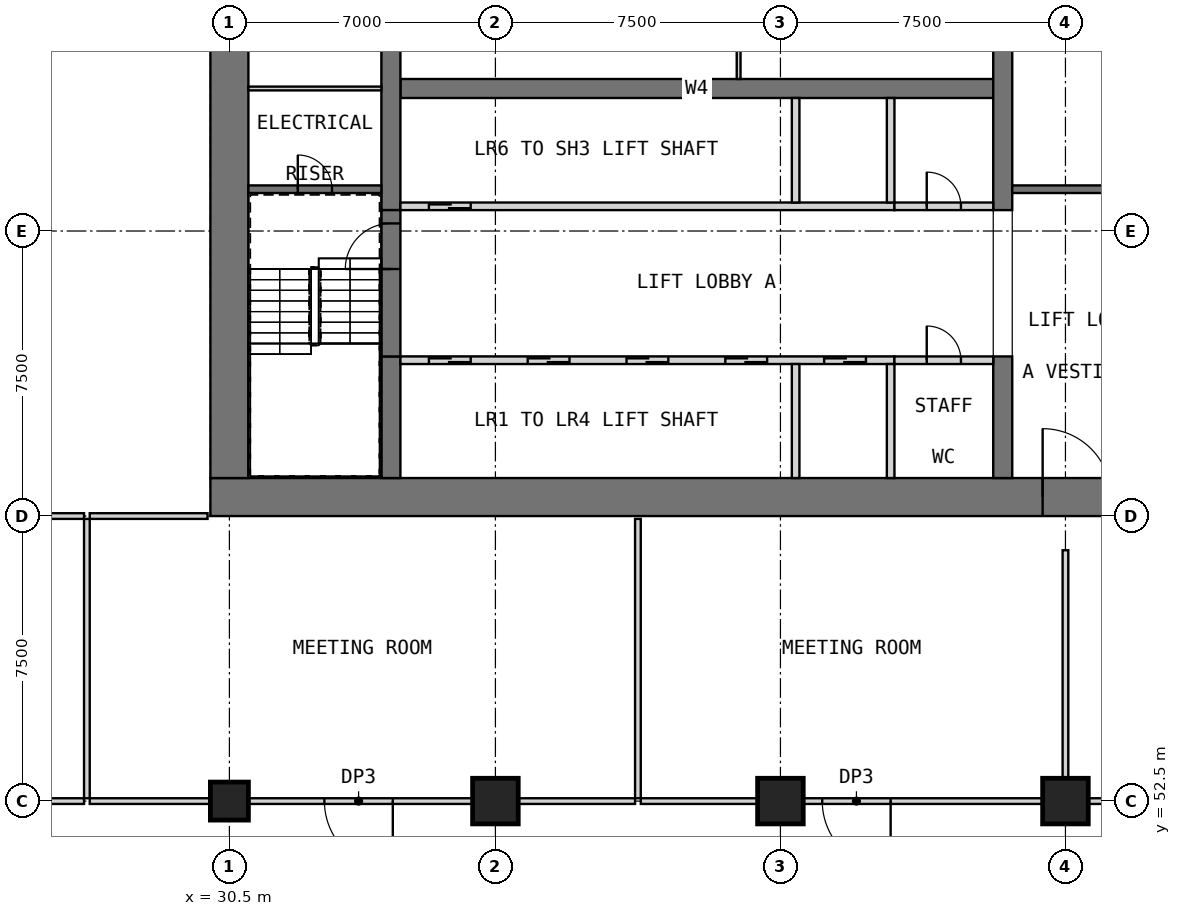
"""IFC4 building model, lengths in metres.
Left out: names, types, materials, properties, quantities, classifications, styles, units other than length and angle.
Written with IfcOpenShell. Run it as: python <this file> out.ifc"""

import sys

from ifc_helpers import new_model, si_unit, direction, frame, frame_2d, origin, origin_2d, place, context, subcontext, project, spatial, rectangle, extrude, element, fill, save


model = new_model("IFC4")
c1 = context("Model", 3, precision=1e-05, world=origin(), true_north=direction((0.0, 1.0)))
c2 = subcontext(c1, "Body", "Model", "MODEL_VIEW")
j1 = project(units=[si_unit("LENGTHUNIT", "METRE"), si_unit("PLANEANGLEUNIT", "RADIAN")], contexts=[c1])
p1 = place(None, origin())
s1 = spatial("IfcSite", under=j1, at=p1, CompositionType="ELEMENT")
p2 = place(p1, origin())
s2 = spatial("IfcBuilding", under=s1, at=p2, CompositionType="ELEMENT")
p3 = place(p2, frame((0.0, 0.0, 23.5)))
s3 = spatial("IfcBuildingStorey", under=s2, at=p3, CompositionType="ELEMENT", Elevation=23.5)
p4 = place(p3, frame((30.5, 52.5, 0.0), z_axis=(0.0, 0.0, 1.0), x_axis=(1.0, 0.0, 0.0)))
e1 = element("IfcColumn", 1, at=p4, inside=s3, PredefinedType="COLUMN", context=c2, shape_type="SweptSolid", body=[
    extrude(rectangle(XDim=1.0, YDim=1.0, at=origin_2d()), origin(), (0.0, 0.0, 1.0), 5.5),
])
for number, where, z_axis, x_axis in (
    (2, (37.5, 52.5, 0.0), (0.0, 0.0, 1.0), (1.0, 0.0, 0.0)),
    (3, (45.0, 52.5, 0.0), (0.0, 0.0, 1.0), (1.0, 0.0, 0.0)),
    (4, (52.5, 52.5, 0.0), (0.0, 0.0, 1.0), (1.0, 0.0, 0.0)),
):
    element("IfcColumn", number, at=place(p3, frame(where, z_axis=z_axis, x_axis=x_axis)), inside=s3, PredefinedType="COLUMN", context=c2, shape_type="SweptSolid", body=[
        extrude(rectangle(XDim=1.2, YDim=1.2, at=origin_2d()), origin(), (0.0, 0.0, 1.0), 5.5),
    ])
p5 = place(p3, frame((30.0, 60.5, 0.0), z_axis=(0.0, 0.0, 1.0), x_axis=(1.0, 0.0, 0.0)))
e5 = element("IfcWall", 5, at=p5, inside=s3, PredefinedType="SHEAR", context=c2, shape_type="SweptSolid", body=[
    extrude(rectangle(XDim=30.0, YDim=1.0, at=frame_2d((15.0, 0.0))), origin(), (0.0, 0.0, 1.0), 5.5),
])
p6 = place(p5, frame((21.9, 0.0, 0.0)))
e6 = element("IfcOpeningElement", 6, at=p6, cuts=e5, PredefinedType="OPENING", context=c2, shape_type="SweptSolid", body=[
    extrude(rectangle(XDim=1.8, YDim=2.1, at=frame_2d((0.9, 1.05))), frame((0.0, 0.51, 0.0), z_axis=(0.0, -1.0, 0.0), x_axis=(1.0, 0.0, 0.0)), (0.0, 0.0, 1.0), 1.02),
])
p7 = place(p5, frame((26.5, 0.0, 0.0)))
e7 = element("IfcOpeningElement", 7, at=p7, cuts=e5, PredefinedType="OPENING", context=c2, shape_type="SweptSolid", body=[
    extrude(rectangle(XDim=1.2, YDim=2.1, at=frame_2d((0.6, 1.05))), frame((0.0, 0.51, 0.0), z_axis=(0.0, -1.0, 0.0), x_axis=(1.0, 0.0, 0.0)), (0.0, 0.0, 1.0), 1.02),
])
p8 = place(p3, frame((30.5, 61.0, 0.0), z_axis=(0.0, 0.0, 1.0), x_axis=(0.0, 1.0, 0.0)))
e8 = element("IfcWall", 8, at=p8, inside=s3, PredefinedType="SHEAR", context=c2, shape_type="SweptSolid", body=[
    extrude(rectangle(XDim=20.5, YDim=1.0, at=frame_2d((10.25, 0.0))), origin(), (0.0, 0.0, 1.0), 5.5),
])
p9 = place(p3, frame((35.0, 71.25, 0.0), z_axis=(0.0, 0.0, 1.0), x_axis=(1.0, 0.0, 0.0)))
e9 = element("IfcWall", 9, at=p9, inside=s3, PredefinedType="SHEAR", context=c2, shape_type="SweptSolid", body=[
    extrude(rectangle(XDim=15.6, YDim=0.5, at=frame_2d((7.8, 0.0))), origin(), (0.0, 0.0, 1.0), 5.5),
])
p10 = place(p3, frame((34.75, 61.0, 0.0), z_axis=(0.0, 0.0, 1.0), x_axis=(0.0, 1.0, 0.0)))
e10 = element("IfcWall", 10, at=p10, inside=s3, PredefinedType="SHEAR", context=c2, shape_type="SweptSolid", body=[
    extrude(rectangle(XDim=3.2, YDim=0.5, at=frame_2d((1.6, 0.0))), origin(), (0.0, 0.0, 1.0), 5.5),
])
p11 = place(p3, frame((34.75, 68.05, 0.0), z_axis=(0.0, 0.0, 1.0), x_axis=(0.0, 1.0, 0.0)))
e11 = element("IfcWall", 11, at=p11, inside=s3, PredefinedType="SHEAR", context=c2, shape_type="SweptSolid", body=[
    extrude(rectangle(XDim=6.4, YDim=0.5, at=frame_2d((3.2, 0.0))), origin(), (0.0, 0.0, 1.0), 5.5),
])
p12 = place(p3, frame((50.85, 61.0, 0.0), z_axis=(0.0, 0.0, 1.0), x_axis=(0.0, 1.0, 0.0)))
e12 = element("IfcWall", 12, at=p12, inside=s3, PredefinedType="SHEAR", context=c2, shape_type="SweptSolid", body=[
    extrude(rectangle(XDim=3.2, YDim=0.5, at=frame_2d((1.6, 0.0))), origin(), (0.0, 0.0, 1.0), 5.5),
])
p13 = place(p3, frame((50.85, 68.05, 0.0), z_axis=(0.0, 0.0, 1.0), x_axis=(0.0, 1.0, 0.0)))
e13 = element("IfcWall", 13, at=p13, inside=s3, PredefinedType="SHEAR", context=c2, shape_type="SweptSolid", body=[
    extrude(rectangle(XDim=6.4, YDim=0.5, at=frame_2d((3.2, 0.0))), origin(), (0.0, 0.0, 1.0), 5.5),
])
p14 = place(p3, frame((35.0, 64.1, 0.0), z_axis=(0.0, 0.0, 1.0), x_axis=(1.0, 0.0, 0.0)))
e14 = element("IfcWall", 14, at=p14, inside=s3, PredefinedType="SOLIDWALL", context=c2, shape_type="SweptSolid", body=[
    extrude(rectangle(XDim=13.0, YDim=0.2, at=frame_2d((6.5, 0.0))), origin(), (0.0, 0.0, 1.0), 5.5),
])
p15 = place(p14, frame((0.75, 0.0, 0.0)))
e15 = element("IfcOpeningElement", 15, at=p15, cuts=e14, PredefinedType="OPENING", context=c2, shape_type="SweptSolid", body=[
    extrude(rectangle(XDim=1.1, YDim=2.1, at=frame_2d((0.55, 1.05))), frame((0.0, 0.11, 0.0), z_axis=(0.0, -1.0, 0.0), x_axis=(1.0, 0.0, 0.0)), (0.0, 0.0, 1.0), 0.22),
])
p16 = place(p14, frame((3.35, 0.0, 0.0)))
e16 = element("IfcOpeningElement", 16, at=p16, cuts=e14, PredefinedType="OPENING", context=c2, shape_type="SweptSolid", body=[
    extrude(rectangle(XDim=1.1, YDim=2.1, at=frame_2d((0.55, 1.05))), frame((0.0, 0.11, 0.0), z_axis=(0.0, -1.0, 0.0), x_axis=(1.0, 0.0, 0.0)), (0.0, 0.0, 1.0), 0.22),
])
p17 = place(p14, frame((5.95, 0.0, 0.0)))
e17 = element("IfcOpeningElement", 17, at=p17, cuts=e14, PredefinedType="OPENING", context=c2, shape_type="SweptSolid", body=[
    extrude(rectangle(XDim=1.1, YDim=2.1, at=frame_2d((0.55, 1.05))), frame((0.0, 0.11, 0.0), z_axis=(0.0, -1.0, 0.0), x_axis=(1.0, 0.0, 0.0)), (0.0, 0.0, 1.0), 0.22),
])
p18 = place(p14, frame((8.55, 0.0, 0.0)))
e18 = element("IfcOpeningElement", 18, at=p18, cuts=e14, PredefinedType="OPENING", context=c2, shape_type="SweptSolid", body=[
    extrude(rectangle(XDim=1.1, YDim=2.1, at=frame_2d((0.55, 1.05))), frame((0.0, 0.11, 0.0), z_axis=(0.0, -1.0, 0.0), x_axis=(1.0, 0.0, 0.0)), (0.0, 0.0, 1.0), 0.22),
])
p19 = place(p14, frame((11.15, 0.0, 0.0)))
e19 = element("IfcOpeningElement", 19, at=p19, cuts=e14, PredefinedType="OPENING", context=c2, shape_type="SweptSolid", body=[
    extrude(rectangle(XDim=1.1, YDim=2.1, at=frame_2d((0.55, 1.05))), frame((0.0, 0.11, 0.0), z_axis=(0.0, -1.0, 0.0), x_axis=(1.0, 0.0, 0.0)), (0.0, 0.0, 1.0), 0.22),
])
for number, where, z_axis, x_axis in (
    (20, (45.4, 61.0, 0.0), (0.0, 0.0, 1.0), (0.0, 1.0, 0.0)),
    (21, (47.9, 61.0, 0.0), (0.0, 0.0, 1.0), (0.0, 1.0, 0.0)),
):
    element("IfcWall", number, at=place(p3, frame(where, z_axis=z_axis, x_axis=x_axis)), inside=s3, PredefinedType="SOLIDWALL", context=c2, shape_type="SweptSolid", body=[
        extrude(rectangle(XDim=3.0, YDim=0.2, at=frame_2d((1.5, 0.0))), origin(), (0.0, 0.0, 1.0), 5.5),
    ])
p20 = place(p3, frame((48.0, 64.1, 0.0), z_axis=(0.0, 0.0, 1.0), x_axis=(1.0, 0.0, 0.0)))
e22 = element("IfcWall", 22, at=p20, inside=s3, PredefinedType="PARTITIONING", context=c2, shape_type="SweptSolid", body=[
    extrude(rectangle(XDim=2.6, YDim=0.2, at=frame_2d((1.3, 0.0))), origin(), (0.0, 0.0, 1.0), 5.2),
])
p21 = place(p20, frame((0.85, 0.0, 0.0)))
e23 = element("IfcOpeningElement", 23, at=p21, cuts=e22, PredefinedType="OPENING", context=c2, shape_type="SweptSolid", body=[
    extrude(rectangle(XDim=0.9, YDim=2.1, at=frame_2d((0.45, 1.05))), frame((0.0, 0.11, 0.0), z_axis=(0.0, -1.0, 0.0), x_axis=(1.0, 0.0, 0.0)), (0.0, 0.0, 1.0), 0.22),
])
p22 = place(p3, frame((35.0, 68.15, 0.0), z_axis=(0.0, 0.0, 1.0), x_axis=(1.0, 0.0, 0.0)))
e24 = element("IfcWall", 24, at=p22, inside=s3, PredefinedType="SOLIDWALL", context=c2, shape_type="SweptSolid", body=[
    extrude(rectangle(XDim=13.0, YDim=0.2, at=frame_2d((6.5, 0.0))), origin(), (0.0, 0.0, 1.0), 5.5),
])
p23 = place(p22, frame((0.75, 0.0, 0.0)))
e25 = element("IfcOpeningElement", 25, at=p23, cuts=e24, PredefinedType="OPENING", context=c2, shape_type="SweptSolid", body=[
    extrude(rectangle(XDim=1.1, YDim=2.1, at=frame_2d((0.55, 1.05))), frame((0.0, 0.11, 0.0), z_axis=(0.0, -1.0, 0.0), x_axis=(1.0, 0.0, 0.0)), (0.0, 0.0, 1.0), 0.22),
])
for number, where, z_axis, x_axis in (
    (26, (45.4, 68.25, 0.0), (0.0, 0.0, 1.0), (0.0, 1.0, 0.0)),
    (27, (47.9, 68.25, 0.0), (0.0, 0.0, 1.0), (0.0, 1.0, 0.0)),
):
    element("IfcWall", number, at=place(p3, frame(where, z_axis=z_axis, x_axis=x_axis)), inside=s3, PredefinedType="SOLIDWALL", context=c2, shape_type="SweptSolid", body=[
        extrude(rectangle(XDim=2.75, YDim=0.2, at=frame_2d((1.375, 0.0))), origin(), (0.0, 0.0, 1.0), 5.5),
    ])
p24 = place(p3, frame((48.0, 68.15, 0.0), z_axis=(0.0, 0.0, 1.0), x_axis=(1.0, 0.0, 0.0)))
e28 = element("IfcWall", 28, at=p24, inside=s3, PredefinedType="PARTITIONING", context=c2, shape_type="SweptSolid", body=[
    extrude(rectangle(XDim=2.6, YDim=0.2, at=frame_2d((1.3, 0.0))), origin(), (0.0, 0.0, 1.0), 5.2),
])
p25 = place(p24, frame((0.85, 0.0, 0.0)))
e29 = element("IfcOpeningElement", 29, at=p25, cuts=e28, PredefinedType="OPENING", context=c2, shape_type="SweptSolid", body=[
    extrude(rectangle(XDim=0.9, YDim=2.1, at=frame_2d((0.45, 1.05))), frame((0.0, 0.11, 0.0), z_axis=(0.0, -1.0, 0.0), x_axis=(1.0, 0.0, 0.0)), (0.0, 0.0, 1.0), 0.22),
])
p26 = place(p3, frame((43.9, 71.5, 0.0), z_axis=(0.0, 0.0, 1.0), x_axis=(0.0, 1.0, 0.0)))
e30 = element("IfcWall", 30, at=p26, inside=s3, PredefinedType="PARTITIONING", context=c2, shape_type="SweptSolid", body=[
    extrude(rectangle(XDim=2.0, YDim=0.1, at=frame_2d((1.0, 0.0))), origin(), (0.0, 0.0, 1.0), 5.2),
])
p27 = place(p3, frame((34.75, 64.2, 0.0), z_axis=(0.0, 0.0, 1.0), x_axis=(0.0, 1.0, 0.0)))
e31 = element("IfcWall", 31, at=p27, inside=s3, PredefinedType="SOLIDWALL", context=c2, shape_type="SweptSolid", body=[
    extrude(rectangle(XDim=3.85, YDim=0.5, at=frame_2d((1.925, 0.0))), origin(), (0.0, 0.0, 1.0), 4.3),
])
p28 = place(p27, frame((2.3, 0.0, 0.0)))
e32 = element("IfcOpeningElement", 32, at=p28, cuts=e31, PredefinedType="OPENING", context=c2, shape_type="SweptSolid", body=[
    extrude(rectangle(XDim=1.2, YDim=2.1, at=frame_2d((0.6, 1.05))), frame((0.0, 0.26, 0.0), z_axis=(0.0, -1.0, 0.0), x_axis=(1.0, 0.0, 0.0)), (0.0, 0.0, 1.0), 0.52),
])
p29 = place(p3, frame((31.0, 68.6, 0.0), z_axis=(0.0, 0.0, 1.0), x_axis=(1.0, 0.0, 0.0)))
e33 = element("IfcWall", 33, at=p29, inside=s3, PredefinedType="SOLIDWALL", context=c2, shape_type="SweptSolid", body=[
    extrude(rectangle(XDim=3.5, YDim=0.2, at=frame_2d((1.75, 0.0))), origin(), (0.0, 0.0, 1.0), 5.2),
])
p30 = place(p29, frame((1.3, 0.0, 0.0)))
e34 = element("IfcOpeningElement", 34, at=p30, cuts=e33, PredefinedType="OPENING", context=c2, shape_type="SweptSolid", body=[
    extrude(rectangle(XDim=0.9, YDim=2.1, at=frame_2d((0.45, 1.05))), frame((0.0, 0.11, 0.0), z_axis=(0.0, -1.0, 0.0), x_axis=(1.0, 0.0, 0.0)), (0.0, 0.0, 1.0), 0.22),
])
p31 = place(p3, frame((51.1, 68.6, 0.0), z_axis=(0.0, 0.0, 1.0), x_axis=(1.0, 0.0, 0.0)))
e35 = element("IfcWall", 35, at=p31, inside=s3, PredefinedType="SOLIDWALL", context=c2, shape_type="SweptSolid", body=[
    extrude(rectangle(XDim=7.9, YDim=0.2, at=frame_2d((3.95, 0.0))), origin(), (0.0, 0.0, 1.0), 5.2),
])
p32 = place(p3, frame((31.0, 71.25, 0.0), z_axis=(0.0, 0.0, 1.0), x_axis=(1.0, 0.0, 0.0)))
e36 = element("IfcWall", 36, at=p32, inside=s3, PredefinedType="PARTITIONING", context=c2, shape_type="SweptSolid", body=[
    extrude(rectangle(XDim=3.5, YDim=0.1, at=frame_2d((1.75, 0.0))), origin(), (0.0, 0.0, 1.0), 5.2),
])
p33 = place(p3, frame((23.6, 52.5, 0.0), z_axis=(0.0, 0.0, 1.0), x_axis=(1.0, 0.0, 0.0)))
e37 = element("IfcWall", 37, at=p33, inside=s3, PredefinedType="PARTITIONING", context=c2, shape_type="SweptSolid", body=[
    extrude(rectangle(XDim=3.075, YDim=0.15, at=frame_2d((1.538, 0.0))), origin(), (0.0, 0.0, 1.0), 5.2),
])
p34 = place(p3, frame((26.825, 52.5, 0.0), z_axis=(0.0, 0.0, 1.0), x_axis=(1.0, 0.0, 0.0)))
e38 = element("IfcWall", 38, at=p34, inside=s3, PredefinedType="PARTITIONING", context=c2, shape_type="SweptSolid", body=[
    extrude(rectangle(XDim=3.175, YDim=0.15, at=frame_2d((1.587, 0.0))), origin(), (0.0, 0.0, 1.0), 5.2),
])
p35 = place(p3, frame((36.9, 52.5, 0.0), z_axis=(0.0, 0.0, 1.0), x_axis=(-1.0, 0.0, 0.0)))
e39 = element("IfcWall", 39, at=p35, inside=s3, PredefinedType="PARTITIONING", context=c2, shape_type="SweptSolid", body=[
    extrude(rectangle(XDim=5.9, YDim=0.15, at=frame_2d((2.95, 0.0))), origin(), (0.0, 0.0, 1.0), 5.2),
])
p36 = place(p35, frame((2.1, 0.0, 0.0)))
e40 = element("IfcOpeningElement", 40, at=p36, cuts=e39, PredefinedType="OPENING", context=c2, shape_type="SweptSolid", body=[
    extrude(rectangle(XDim=1.8, YDim=2.4, at=frame_2d((0.9, 1.2))), frame((0.0, 0.085, 0.0), z_axis=(0.0, -1.0, 0.0), x_axis=(1.0, 0.0, 0.0)), (0.0, 0.0, 1.0), 0.17),
])
for number, where, z_axis, x_axis in (
    (41, (38.1, 52.5, 0.0), (0.0, 0.0, 1.0), (1.0, 0.0, 0.0)),
    (42, (41.325, 52.5, 0.0), (0.0, 0.0, 1.0), (1.0, 0.0, 0.0)),
):
    element("IfcWall", number, at=place(p3, frame(where, z_axis=z_axis, x_axis=x_axis)), inside=s3, PredefinedType="PARTITIONING", context=c2, shape_type="SweptSolid", body=[
        extrude(rectangle(XDim=3.075, YDim=0.15, at=frame_2d((1.538, 0.0))), origin(), (0.0, 0.0, 1.0), 5.2),
    ])
p37 = place(p3, frame((51.9, 52.5, 0.0), z_axis=(0.0, 0.0, 1.0), x_axis=(-1.0, 0.0, 0.0)))
e43 = element("IfcWall", 43, at=p37, inside=s3, PredefinedType="PARTITIONING", context=c2, shape_type="SweptSolid", body=[
    extrude(rectangle(XDim=6.3, YDim=0.15, at=frame_2d((3.15, 0.0))), origin(), (0.0, 0.0, 1.0), 5.2),
])
p38 = place(p37, frame((4.0, 0.0, 0.0)))
e44 = element("IfcOpeningElement", 44, at=p38, cuts=e43, PredefinedType="OPENING", context=c2, shape_type="SweptSolid", body=[
    extrude(rectangle(XDim=1.8, YDim=2.4, at=frame_2d((0.9, 1.2))), frame((0.0, 0.085, 0.0), z_axis=(0.0, -1.0, 0.0), x_axis=(1.0, 0.0, 0.0)), (0.0, 0.0, 1.0), 0.17),
])
p39 = place(p3, frame((53.1, 52.5, 0.0), z_axis=(0.0, 0.0, 1.0), x_axis=(1.0, 0.0, 0.0)))
e45 = element("IfcWall", 45, at=p39, inside=s3, PredefinedType="PARTITIONING", context=c2, shape_type="SweptSolid", body=[
    extrude(rectangle(XDim=6.3, YDim=0.15, at=frame_2d((3.15, 0.0))), origin(), (0.0, 0.0, 1.0), 5.2),
])
p40 = place(p3, frame((23.6, 60.0, 0.0), z_axis=(0.0, 0.0, 1.0), x_axis=(1.0, 0.0, 0.0)))
e46 = element("IfcWall", 46, at=p40, inside=s3, PredefinedType="PARTITIONING", context=c2, shape_type="SweptSolid", body=[
    extrude(rectangle(XDim=3.075, YDim=0.15, at=frame_2d((1.538, 0.0))), origin(), (0.0, 0.0, 1.0), 5.2),
])
p41 = place(p3, frame((26.825, 60.0, 0.0), z_axis=(0.0, 0.0, 1.0), x_axis=(1.0, 0.0, 0.0)))
e47 = element("IfcWall", 47, at=p41, inside=s3, PredefinedType="PARTITIONING", context=c2, shape_type="SweptSolid", body=[
    extrude(rectangle(XDim=3.1, YDim=0.15, at=frame_2d((1.55, 0.0))), origin(), (0.0, 0.0, 1.0), 5.2),
])
for number, where, z_axis, x_axis in (
    (48, (26.75, 52.575, 0.0), (0.0, 0.0, 1.0), (0.0, 1.0, 0.0)),
    (49, (41.25, 52.575, 0.0), (0.0, 0.0, 1.0), (0.0, 1.0, 0.0)),
):
    element("IfcWall", number, at=place(p3, frame(where, z_axis=z_axis, x_axis=x_axis)), inside=s3, PredefinedType="PARTITIONING", context=c2, shape_type="SweptSolid", body=[
        extrude(rectangle(XDim=7.35, YDim=0.15, at=frame_2d((3.675, 0.0))), origin(), (0.0, 0.0, 1.0), 5.2),
    ])
p42 = place(p3, frame((52.5, 53.1, 0.0), z_axis=(0.0, 0.0, 1.0), x_axis=(0.0, 1.0, 0.0)))
e50 = element("IfcWall", 50, at=p42, inside=s3, PredefinedType="PARTITIONING", context=c2, shape_type="SweptSolid", body=[
    extrude(rectangle(XDim=6.0, YDim=0.15, at=frame_2d((3.0, 0.0))), origin(), (0.0, 0.0, 1.0), 5.2),
])
p43 = place(p15, origin())
e51 = element("IfcDoor", 51, at=p43, inside=s3, OperationType="DOUBLE_DOOR_SLIDING", PredefinedType="DOOR", context=c2, shape_type="SweptSolid", body=[
    extrude(rectangle(XDim=1.1, YDim=2.1, at=frame_2d((0.55, 1.05))), frame((0.0, 0.025, 0.0), z_axis=(0.0, -1.0, 0.0), x_axis=(1.0, 0.0, 0.0)), (0.0, 0.0, 1.0), 0.05),
])
fill(e15, e51)
p44 = place(p16, origin())
e52 = element("IfcDoor", 52, at=p44, inside=s3, OperationType="DOUBLE_DOOR_SLIDING", PredefinedType="DOOR", context=c2, shape_type="SweptSolid", body=[
    extrude(rectangle(XDim=1.1, YDim=2.1, at=frame_2d((0.55, 1.05))), frame((0.0, 0.025, 0.0), z_axis=(0.0, -1.0, 0.0), x_axis=(1.0, 0.0, 0.0)), (0.0, 0.0, 1.0), 0.05),
])
fill(e16, e52)
p45 = place(p17, origin())
e53 = element("IfcDoor", 53, at=p45, inside=s3, OperationType="DOUBLE_DOOR_SLIDING", PredefinedType="DOOR", context=c2, shape_type="SweptSolid", body=[
    extrude(rectangle(XDim=1.1, YDim=2.1, at=frame_2d((0.55, 1.05))), frame((0.0, 0.025, 0.0), z_axis=(0.0, -1.0, 0.0), x_axis=(1.0, 0.0, 0.0)), (0.0, 0.0, 1.0), 0.05),
])
fill(e17, e53)
p46 = place(p18, origin())
e54 = element("IfcDoor", 54, at=p46, inside=s3, OperationType="DOUBLE_DOOR_SLIDING", PredefinedType="DOOR", context=c2, shape_type="SweptSolid", body=[
    extrude(rectangle(XDim=1.1, YDim=2.1, at=frame_2d((0.55, 1.05))), frame((0.0, 0.025, 0.0), z_axis=(0.0, -1.0, 0.0), x_axis=(1.0, 0.0, 0.0)), (0.0, 0.0, 1.0), 0.05),
])
fill(e18, e54)
p47 = place(p19, origin())
e55 = element("IfcDoor", 55, at=p47, inside=s3, OperationType="DOUBLE_DOOR_SLIDING", PredefinedType="DOOR", context=c2, shape_type="SweptSolid", body=[
    extrude(rectangle(XDim=1.1, YDim=2.1, at=frame_2d((0.55, 1.05))), frame((0.0, 0.025, 0.0), z_axis=(0.0, -1.0, 0.0), x_axis=(1.0, 0.0, 0.0)), (0.0, 0.0, 1.0), 0.05),
])
fill(e19, e55)
p48 = place(p21, origin())
e56 = element("IfcDoor", 56, at=p48, inside=s3, OperationType="SINGLE_SWING_RIGHT", PredefinedType="DOOR", context=c2, shape_type="SweptSolid", body=[
    extrude(rectangle(XDim=0.9, YDim=2.1, at=frame_2d((0.45, 1.05))), frame((0.0, 0.025, 0.0), z_axis=(0.0, -1.0, 0.0), x_axis=(1.0, 0.0, 0.0)), (0.0, 0.0, 1.0), 0.05),
])
fill(e23, e56)
p49 = place(p23, origin())
e57 = element("IfcDoor", 57, at=p49, inside=s3, OperationType="DOUBLE_DOOR_SLIDING", PredefinedType="DOOR", context=c2, shape_type="SweptSolid", body=[
    extrude(rectangle(XDim=1.1, YDim=2.1, at=frame_2d((0.55, 1.05))), frame((0.0, 0.025, 0.0), z_axis=(0.0, -1.0, 0.0), x_axis=(1.0, 0.0, 0.0)), (0.0, 0.0, 1.0), 0.05),
])
fill(e25, e57)
p50 = place(p25, origin())
e58 = element("IfcDoor", 58, at=p50, inside=s3, OperationType="SINGLE_SWING_RIGHT", PredefinedType="DOOR", context=c2, shape_type="SweptSolid", body=[
    extrude(rectangle(XDim=0.9, YDim=2.1, at=frame_2d((0.45, 1.05))), frame((0.0, 0.025, 0.0), z_axis=(0.0, -1.0, 0.0), x_axis=(1.0, 0.0, 0.0)), (0.0, 0.0, 1.0), 0.05),
])
fill(e29, e58)
p51 = place(p6, origin())
e59 = element("IfcDoor", 59, at=p51, inside=s3, OperationType="DOUBLE_DOOR_SINGLE_SWING", PredefinedType="DOOR", context=c2, shape_type="SweptSolid", body=[
    extrude(rectangle(XDim=1.8, YDim=2.1, at=frame_2d((0.9, 1.05))), frame((0.0, 0.025, 0.0), z_axis=(0.0, -1.0, 0.0), x_axis=(1.0, 0.0, 0.0)), (0.0, 0.0, 1.0), 0.05),
])
fill(e6, e59)
p52 = place(p28, origin())
e60 = element("IfcDoor", 60, at=p52, inside=s3, OperationType="SINGLE_SWING_LEFT", PredefinedType="DOOR", context=c2, shape_type="SweptSolid", body=[
    extrude(rectangle(XDim=1.2, YDim=2.1, at=frame_2d((0.6, 1.05))), frame((0.0, 0.025, 0.0), z_axis=(0.0, -1.0, 0.0), x_axis=(1.0, 0.0, 0.0)), (0.0, 0.0, 1.0), 0.05),
])
fill(e32, e60)
p53 = place(p30, origin())
e61 = element("IfcDoor", 61, at=p53, inside=s3, OperationType="SINGLE_SWING_LEFT", PredefinedType="DOOR", context=c2, shape_type="SweptSolid", body=[
    extrude(rectangle(XDim=0.9, YDim=2.1, at=frame_2d((0.45, 1.05))), frame((0.0, 0.025, 0.0), z_axis=(0.0, -1.0, 0.0), x_axis=(1.0, 0.0, 0.0)), (0.0, 0.0, 1.0), 0.05),
])
fill(e34, e61)
p54 = place(p36, origin())
e62 = element("IfcDoor", 62, at=p54, inside=s3, OperationType="SINGLE_SWING_LEFT", PredefinedType="DOOR", context=c2, shape_type="SweptSolid", body=[
    extrude(rectangle(XDim=1.8, YDim=2.4, at=frame_2d((0.9, 1.2))), frame((0.0, 0.025, 0.0), z_axis=(0.0, -1.0, 0.0), x_axis=(1.0, 0.0, 0.0)), (0.0, 0.0, 1.0), 0.05),
])
fill(e40, e62)
p55 = place(p38, origin())
e63 = element("IfcDoor", 63, at=p55, inside=s3, OperationType="SINGLE_SWING_LEFT", PredefinedType="DOOR", context=c2, shape_type="SweptSolid", body=[
    extrude(rectangle(XDim=1.8, YDim=2.4, at=frame_2d((0.9, 1.2))), frame((0.0, 0.025, 0.0), z_axis=(0.0, -1.0, 0.0), x_axis=(1.0, 0.0, 0.0)), (0.0, 0.0, 1.0), 0.05),
])
fill(e44, e63)
save(model, sys.argv[1])
